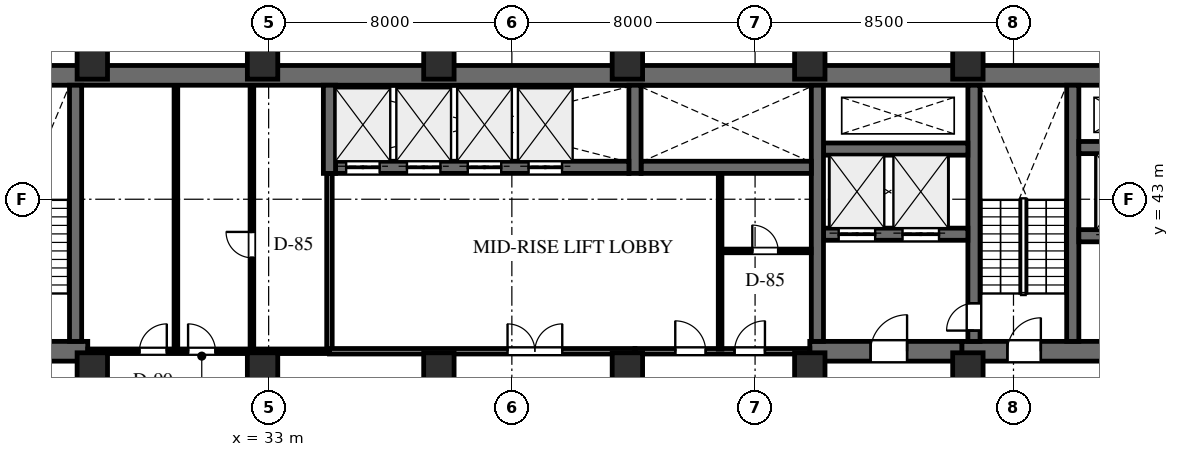
"""IFC4 building model, lengths in metres.
Left out: names, types, materials, properties, quantities, classifications, styles, units other than length and angle.
Written with IfcOpenShell. Run it as: python <this file> out.ifc"""

import sys

from ifc_helpers import new_model, si_unit, direction, frame, frame_2d, origin, origin_2d, place, context, subcontext, project, spatial, rectangle, extrude, element, fill, save


model = new_model("IFC4")
c1 = context("Model", 3, precision=1e-05, world=origin(), true_north=direction((0.0, 1.0)))
c2 = subcontext(c1, "Body", "Model", "MODEL_VIEW")
j1 = project(units=[si_unit("LENGTHUNIT", "METRE"), si_unit("PLANEANGLEUNIT", "RADIAN")], contexts=[c1])
p1 = place(None, origin())
s1 = spatial("IfcSite", under=j1, at=p1, CompositionType="ELEMENT")
p2 = place(p1, origin())
s2 = spatial("IfcBuilding", under=s1, at=p2, CompositionType="ELEMENT")
p3 = place(p2, frame((0.0, 0.0, 124.0)))
s3 = spatial("IfcBuildingStorey", under=s2, at=p3, CompositionType="ELEMENT", Elevation=124.0)
p4 = place(p3, frame((22.9, 47.075, 0.0), z_axis=(0.0, 0.0, 1.0), x_axis=(1.0, 0.0, 0.0)))
e1 = element("IfcWall", 1, at=p4, inside=s3, PredefinedType="SHEAR", context=c2, shape_type="SweptSolid", body=[
    extrude(rectangle(XDim=43.6, YDim=0.65, at=frame_2d((21.8, 0.0))), origin(), (0.0, 0.0, 1.0), 4.0),
])
p5 = place(p3, frame((55.8, 38.0, 0.0), z_axis=(0.0, 0.0, 1.0), x_axis=(1.0, 0.0, 0.0)))
e2 = element("IfcWall", 2, at=p5, inside=s3, PredefinedType="SHEAR", context=c2, shape_type="SweptSolid", body=[
    extrude(rectangle(XDim=10.7, YDim=0.65, at=frame_2d((5.35, 0.0))), origin(), (0.0, 0.0, 1.0), 4.0),
])
p6 = place(p5, frame((1.5, 0.0, 0.0)))
e3 = element("IfcOpeningElement", 3, at=p6, cuts=e2, PredefinedType="OPENING", context=c2, shape_type="SweptSolid", body=[
    extrude(rectangle(XDim=1.1, YDim=2.2, at=frame_2d((0.55, 1.1))), frame((0.0, 0.335, 0.0), z_axis=(0.0, -1.0, 0.0), x_axis=(1.0, 0.0, 0.0)), (0.0, 0.0, 1.0), 0.67),
])
p7 = place(p5, frame((4.82, 0.0, 0.0)))
e4 = element("IfcOpeningElement", 4, at=p7, cuts=e2, PredefinedType="OPENING", context=c2, shape_type="SweptSolid", body=[
    extrude(rectangle(XDim=1.0, YDim=2.15, at=frame_2d((0.5, 1.075))), frame((0.0, 0.335, 0.0), z_axis=(0.0, -1.0, 0.0), x_axis=(1.0, 0.0, 0.0)), (0.0, 0.0, 1.0), 0.67),
])
p8 = place(p5, frame((8.05, 0.0, 0.0)))
e5 = element("IfcOpeningElement", 5, at=p8, cuts=e2, PredefinedType="OPENING", context=c2, shape_type="SweptSolid", body=[
    extrude(rectangle(XDim=1.1, YDim=2.2, at=frame_2d((0.55, 1.1))), frame((0.0, 0.335, 0.0), z_axis=(0.0, -1.0, 0.0), x_axis=(1.0, 0.0, 0.0)), (0.0, 0.0, 1.0), 0.67),
])
p9 = place(p3, frame((59.45, 38.325, 0.0), z_axis=(0.0, 0.0, 1.0), x_axis=(0.0, 1.0, 0.0)))
e6 = element("IfcWall", 6, at=p9, inside=s3, PredefinedType="SHEAR", context=c2, shape_type="SweptSolid", body=[
    extrude(rectangle(XDim=8.425, YDim=0.4, at=frame_2d((4.212, 0.0))), origin(), (0.0, 0.0, 1.0), 4.0),
])
p10 = place(p3, frame((56.2, 38.325, 0.0), z_axis=(0.0, 0.0, 1.0), x_axis=(0.0, 1.0, 0.0)))
e7 = element("IfcWall", 7, at=p10, inside=s3, PredefinedType="SHEAR", context=c2, shape_type="SweptSolid", body=[
    extrude(rectangle(XDim=8.425, YDim=0.4, at=frame_2d((4.212, 0.0))), origin(), (0.0, 0.0, 1.0), 4.0),
])
p11 = place(p10, frame((0.355, 0.0, 0.0)))
e8 = element("IfcOpeningElement", 8, at=p11, cuts=e7, PredefinedType="OPENING", context=c2, shape_type="SweptSolid", body=[
    extrude(rectangle(XDim=0.9, YDim=2.15, at=frame_2d((0.45, 1.075))), frame((0.0, 0.21, 0.0), z_axis=(0.0, -1.0, 0.0), x_axis=(1.0, 0.0, 0.0)), (0.0, 0.0, 1.0), 0.42),
])
p12 = place(p3, frame((59.65, 41.8, 0.0), z_axis=(0.0, 0.0, 1.0), x_axis=(1.0, 0.0, 0.0)))
e9 = element("IfcWall", 9, at=p12, inside=s3, PredefinedType="SHEAR", context=c2, shape_type="SweptSolid", body=[
    extrude(rectangle(XDim=2.95, YDim=0.4, at=frame_2d((1.475, 0.0))), origin(), (0.0, 0.0, 1.0), 4.0),
])
p13 = place(p12, frame((0.87, 0.0, 0.0)))
e10 = element("IfcOpeningElement", 10, at=p13, cuts=e9, PredefinedType="OPENING", context=c2, shape_type="SweptSolid", body=[
    extrude(rectangle(XDim=1.2, YDim=2.2, at=frame_2d((0.6, 1.1))), frame((0.0, 0.21, 0.0), z_axis=(0.0, -1.0, 0.0), x_axis=(1.0, 0.0, 0.0)), (0.0, 0.0, 1.0), 0.42),
])
p14 = place(p3, frame((59.65, 44.7, 0.0), z_axis=(0.0, 0.0, 1.0), x_axis=(1.0, 0.0, 0.0)))
e11 = element("IfcWall", 11, at=p14, inside=s3, PredefinedType="SHEAR", context=c2, shape_type="SweptSolid", body=[
    extrude(rectangle(XDim=2.95, YDim=0.4, at=frame_2d((1.475, 0.0))), origin(), (0.0, 0.0, 1.0), 4.0),
])
p15 = place(p3, frame((50.8, 38.0, 0.0), z_axis=(0.0, 0.0, 1.0), x_axis=(1.0, 0.0, 0.0)))
e12 = element("IfcWall", 12, at=p15, inside=s3, PredefinedType="SHEAR", context=c2, shape_type="SweptSolid", body=[
    extrude(rectangle(XDim=5.0, YDim=0.65, at=frame_2d((2.5, 0.0))), origin(), (0.0, 0.0, 1.0), 4.0),
])
p16 = place(p15, frame((2.0, 0.0, 0.0)))
e13 = element("IfcOpeningElement", 13, at=p16, cuts=e12, PredefinedType="OPENING", context=c2, shape_type="SweptSolid", body=[
    extrude(rectangle(XDim=1.2, YDim=2.2, at=frame_2d((0.6, 1.1))), frame((0.0, 0.335, 0.0), z_axis=(0.0, -1.0, 0.0), x_axis=(1.0, 0.0, 0.0)), (0.0, 0.0, 1.0), 0.67),
])
p17 = place(p3, frame((51.25, 41.85, 0.0), z_axis=(0.0, 0.0, 1.0), x_axis=(1.0, 0.0, 0.0)))
e14 = element("IfcWall", 14, at=p17, inside=s3, PredefinedType="SHEAR", context=c2, shape_type="SweptSolid", body=[
    extrude(rectangle(XDim=4.75, YDim=0.4, at=frame_2d((2.375, 0.0))), origin(), (0.0, 0.0, 1.0), 4.0),
])
p18 = place(p17, frame((0.5, 0.0, 0.0)))
e15 = element("IfcOpeningElement", 15, at=p18, cuts=e14, PredefinedType="OPENING", context=c2, shape_type="SweptSolid", body=[
    extrude(rectangle(XDim=1.2, YDim=2.2, at=frame_2d((0.6, 1.1))), frame((0.0, 0.21, 0.0), z_axis=(0.0, -1.0, 0.0), x_axis=(1.0, 0.0, 0.0)), (0.0, 0.0, 1.0), 0.42),
])
p19 = place(p17, frame((2.6, 0.0, 0.0)))
e16 = element("IfcOpeningElement", 16, at=p19, cuts=e14, PredefinedType="OPENING", context=c2, shape_type="SweptSolid", body=[
    extrude(rectangle(XDim=1.2, YDim=2.2, at=frame_2d((0.6, 1.1))), frame((0.0, 0.21, 0.0), z_axis=(0.0, -1.0, 0.0), x_axis=(1.0, 0.0, 0.0)), (0.0, 0.0, 1.0), 0.42),
])
p20 = place(p3, frame((51.25, 44.65, 0.0), z_axis=(0.0, 0.0, 1.0), x_axis=(1.0, 0.0, 0.0)))
e17 = element("IfcWall", 17, at=p20, inside=s3, PredefinedType="SHEAR", context=c2, shape_type="SweptSolid", body=[
    extrude(rectangle(XDim=4.75, YDim=0.4, at=frame_2d((2.375, 0.0))), origin(), (0.0, 0.0, 1.0), 4.0),
])
p21 = place(p3, frame((51.05, 38.325, 0.0), z_axis=(0.0, 0.0, 1.0), x_axis=(0.0, 1.0, 0.0)))
e18 = element("IfcWall", 18, at=p21, inside=s3, PredefinedType="SHEAR", context=c2, shape_type="SweptSolid", body=[
    extrude(rectangle(XDim=8.425, YDim=0.4, at=frame_2d((4.212, 0.0))), origin(), (0.0, 0.0, 1.0), 4.0),
])
p22 = place(p3, frame((45.25, 44.05, 0.0), z_axis=(0.0, 0.0, 1.0), x_axis=(1.0, 0.0, 0.0)))
e19 = element("IfcWall", 19, at=p22, inside=s3, PredefinedType="SHEAR", context=c2, shape_type="SweptSolid", body=[
    extrude(rectangle(XDim=5.6, YDim=0.4, at=frame_2d((2.8, 0.0))), origin(), (0.0, 0.0, 1.0), 4.0),
])
p23 = place(p3, frame((45.05, 43.85, 0.0), z_axis=(0.0, 0.0, 1.0), x_axis=(0.0, 1.0, 0.0)))
e20 = element("IfcWall", 20, at=p23, inside=s3, PredefinedType="SHEAR", context=c2, shape_type="SweptSolid", body=[
    extrude(rectangle(XDim=2.9, YDim=0.4, at=frame_2d((1.45, 0.0))), origin(), (0.0, 0.0, 1.0), 4.0),
])
p24 = place(p3, frame((35.2, 44.05, 0.0), z_axis=(0.0, 0.0, 1.0), x_axis=(1.0, 0.0, 0.0)))
e21 = element("IfcWall", 21, at=p24, inside=s3, PredefinedType="SHEAR", context=c2, shape_type="SweptSolid", body=[
    extrude(rectangle(XDim=9.65, YDim=0.4, at=frame_2d((4.825, 0.0))), origin(), (0.0, 0.0, 1.0), 4.0),
])
p25 = place(p24, frame((0.35, 0.0, 0.0)))
e22 = element("IfcOpeningElement", 22, at=p25, cuts=e21, PredefinedType="OPENING", context=c2, shape_type="SweptSolid", body=[
    extrude(rectangle(XDim=1.1, YDim=2.2, at=frame_2d((0.55, 1.1))), frame((0.0, 0.21, 0.0), z_axis=(0.0, -1.0, 0.0), x_axis=(1.0, 0.0, 0.0)), (0.0, 0.0, 1.0), 0.42),
])
p26 = place(p24, frame((2.35, 0.0, 0.0)))
e23 = element("IfcOpeningElement", 23, at=p26, cuts=e21, PredefinedType="OPENING", context=c2, shape_type="SweptSolid", body=[
    extrude(rectangle(XDim=1.1, YDim=2.2, at=frame_2d((0.55, 1.1))), frame((0.0, 0.21, 0.0), z_axis=(0.0, -1.0, 0.0), x_axis=(1.0, 0.0, 0.0)), (0.0, 0.0, 1.0), 0.42),
])
p27 = place(p24, frame((4.35, 0.0, 0.0)))
e24 = element("IfcOpeningElement", 24, at=p27, cuts=e21, PredefinedType="OPENING", context=c2, shape_type="SweptSolid", body=[
    extrude(rectangle(XDim=1.1, YDim=2.2, at=frame_2d((0.55, 1.1))), frame((0.0, 0.21, 0.0), z_axis=(0.0, -1.0, 0.0), x_axis=(1.0, 0.0, 0.0)), (0.0, 0.0, 1.0), 0.42),
])
p28 = place(p24, frame((6.35, 0.0, 0.0)))
e25 = element("IfcOpeningElement", 25, at=p28, cuts=e21, PredefinedType="OPENING", context=c2, shape_type="SweptSolid", body=[
    extrude(rectangle(XDim=1.1, YDim=2.2, at=frame_2d((0.55, 1.1))), frame((0.0, 0.21, 0.0), z_axis=(0.0, -1.0, 0.0), x_axis=(1.0, 0.0, 0.0)), (0.0, 0.0, 1.0), 0.42),
])
p29 = place(p3, frame((35.0, 43.85, 0.0), z_axis=(0.0, 0.0, 1.0), x_axis=(0.0, 1.0, 0.0)))
e26 = element("IfcWall", 26, at=p29, inside=s3, PredefinedType="SHEAR", context=c2, shape_type="SweptSolid", body=[
    extrude(rectangle(XDim=2.9, YDim=0.4, at=frame_2d((1.45, 0.0))), origin(), (0.0, 0.0, 1.0), 4.0),
])
p30 = place(p3, frame((22.95, 38.0, 0.0), z_axis=(0.0, 0.0, 1.0), x_axis=(1.0, 0.0, 0.0)))
e27 = element("IfcWall", 27, at=p30, inside=s3, PredefinedType="SHEAR", context=c2, shape_type="SweptSolid", body=[
    extrude(rectangle(XDim=4.1, YDim=0.65, at=frame_2d((2.05, 0.0))), origin(), (0.0, 0.0, 1.0), 4.0),
])
p31 = place(p30, frame((1.5, 0.0, 0.0)))
e28 = element("IfcOpeningElement", 28, at=p31, cuts=e27, PredefinedType="OPENING", context=c2, shape_type="SweptSolid", body=[
    extrude(rectangle(XDim=1.1, YDim=2.2, at=frame_2d((0.55, 1.1))), frame((0.0, 0.335, 0.0), z_axis=(0.0, -1.0, 0.0), x_axis=(1.0, 0.0, 0.0)), (0.0, 0.0, 1.0), 0.67),
])
p32 = place(p3, frame((26.65, 38.325, 0.0), z_axis=(0.0, 0.0, 1.0), x_axis=(0.0, 1.0, 0.0)))
e29 = element("IfcWall", 29, at=p32, inside=s3, PredefinedType="SHEAR", context=c2, shape_type="SweptSolid", body=[
    extrude(rectangle(XDim=8.425, YDim=0.4, at=frame_2d((4.212, 0.0))), origin(), (0.0, 0.0, 1.0), 4.0),
])
for number, where, z_axis, x_axis in (
    (30, (56.0, 47.55, 0.0), (0.0, 0.0, 1.0), (1.0, 0.0, 0.0)),
    (31, (56.0, 37.35, 0.0), (0.0, 0.0, 1.0), (1.0, 0.0, 0.0)),
    (32, (50.8, 47.55, 0.0), (0.0, 0.0, 1.0), (1.0, 0.0, 0.0)),
    (33, (50.8, 37.35, 0.0), (0.0, 0.0, 1.0), (1.0, 0.0, 0.0)),
    (34, (44.8, 37.35, 0.0), (0.0, 0.0, 1.0), (1.0, 0.0, 0.0)),
    (35, (44.8, 47.55, 0.0), (0.0, 0.0, 1.0), (1.0, 0.0, 0.0)),
    (36, (38.6, 37.35, 0.0), (0.0, 0.0, 1.0), (1.0, 0.0, 0.0)),
    (37, (38.6, 47.55, 0.0), (0.0, 0.0, 1.0), (1.0, 0.0, 0.0)),
    (38, (32.8, 37.35, 0.0), (0.0, 0.0, 1.0), (1.0, 0.0, 0.0)),
    (39, (32.8, 47.55, 0.0), (0.0, 0.0, 1.0), (1.0, 0.0, 0.0)),
    (40, (27.2, 37.35, 0.0), (0.0, 0.0, 1.0), (1.0, 0.0, 0.0)),
    (41, (27.2, 47.55, 0.0), (0.0, 0.0, 1.0), (1.0, 0.0, 0.0)),
):
    element("IfcColumn", number, at=place(p3, frame(where, z_axis=z_axis, x_axis=x_axis)), inside=s3, PredefinedType="COLUMN", context=c2, shape_type="SweptSolid", body=[
        extrude(rectangle(XDim=1.0, YDim=1.2, at=origin_2d()), origin(), (0.0, 0.0, 1.0), 4.0),
    ])
p33 = place(p3, frame((45.05, 38.0, 0.0), z_axis=(0.0, 0.0, 1.0), x_axis=(1.0, 0.0, 0.0)))
e42 = element("IfcWall", 42, at=p33, inside=s3, PredefinedType="STANDARD", context=c2, shape_type="SweptSolid", body=[
    extrude(rectangle(XDim=5.75, YDim=0.18, at=frame_2d((2.875, 0.0))), origin(), (0.0, 0.0, 1.0), 2.894),
])
p34 = place(p33, frame((1.325, 0.0, 0.0)))
e43 = element("IfcOpeningElement", 43, at=p34, cuts=e42, PredefinedType="OPENING", context=c2, shape_type="SweptSolid", body=[
    extrude(rectangle(XDim=1.0, YDim=2.15, at=frame_2d((0.5, 1.075))), frame((0.0, 0.1, 0.0), z_axis=(0.0, -1.0, 0.0), x_axis=(1.0, 0.0, 0.0)), (0.0, 0.0, 1.0), 0.2),
])
p35 = place(p33, frame((3.275, 0.0, 0.0)))
e44 = element("IfcOpeningElement", 44, at=p35, cuts=e42, PredefinedType="OPENING", context=c2, shape_type="SweptSolid", body=[
    extrude(rectangle(XDim=1.0, YDim=2.15, at=frame_2d((0.5, 1.075))), frame((0.0, 0.1, 0.0), z_axis=(0.0, -1.0, 0.0), x_axis=(1.0, 0.0, 0.0)), (0.0, 0.0, 1.0), 0.2),
])
p36 = place(p3, frame((47.85, 38.068, 0.0), z_axis=(0.0, 0.0, 1.0), x_axis=(0.0, 1.0, 0.0)))
e45 = element("IfcWall", 45, at=p36, inside=s3, PredefinedType="PARTITIONING", context=c2, shape_type="SweptSolid", body=[
    extrude(rectangle(XDim=5.774, YDim=0.12, at=frame_2d((2.887, 0.0))), origin(), (0.0, 0.0, 1.0), 3.75),
])
p37 = place(p3, frame((47.918, 41.3, 0.0), z_axis=(0.0, 0.0, 1.0), x_axis=(1.0, 0.0, 0.0)))
e46 = element("IfcWall", 46, at=p37, inside=s3, PredefinedType="PARTITIONING", context=c2, shape_type="SweptSolid", body=[
    extrude(rectangle(XDim=2.924, YDim=0.12, at=frame_2d((1.462, 0.0))), origin(), (0.0, 0.0, 1.0), 2.894),
])
p38 = place(p37, frame((0.991, 0.0, 0.0)))
e47 = element("IfcOpeningElement", 47, at=p38, cuts=e46, PredefinedType="OPENING", context=c2, shape_type="SweptSolid", body=[
    extrude(rectangle(XDim=0.85, YDim=2.1, at=frame_2d((0.425, 1.05))), frame((0.0, 0.07, 0.0), z_axis=(0.0, -1.0, 0.0), x_axis=(1.0, 0.0, 0.0)), (0.0, 0.0, 1.0), 0.14),
])
p39 = place(p3, frame((27.05, 38.0, 0.0), z_axis=(0.0, 0.0, 1.0), x_axis=(1.0, 0.0, 0.0)))
e48 = element("IfcWall", 48, at=p39, inside=s3, PredefinedType="PARTITIONING", context=c2, shape_type="SweptSolid", body=[
    extrude(rectangle(XDim=7.95, YDim=0.15, at=frame_2d((3.975, 0.0))), origin(), (0.0, 0.0, 1.0), 2.894),
])
p40 = place(p39, frame((1.7, 0.0, 0.0)))
e49 = element("IfcOpeningElement", 49, at=p40, cuts=e48, PredefinedType="OPENING", context=c2, shape_type="SweptSolid", body=[
    extrude(rectangle(XDim=0.9, YDim=2.1, at=frame_2d((0.45, 1.05))), frame((0.0, 0.085, 0.0), z_axis=(0.0, -1.0, 0.0), x_axis=(1.0, 0.0, 0.0)), (0.0, 0.0, 1.0), 0.17),
])
p41 = place(p39, frame((3.3, 0.0, 0.0)))
e50 = element("IfcOpeningElement", 50, at=p41, cuts=e48, PredefinedType="OPENING", context=c2, shape_type="SweptSolid", body=[
    extrude(rectangle(XDim=0.9, YDim=2.1, at=frame_2d((0.45, 1.05))), frame((0.0, 0.085, 0.0), z_axis=(0.0, -1.0, 0.0), x_axis=(1.0, 0.0, 0.0)), (0.0, 0.0, 1.0), 0.17),
])
p42 = place(p3, frame((35.0, 38.0, 0.0), z_axis=(0.0, 0.0, 1.0), x_axis=(0.0, 1.0, 0.0)))
e51 = element("IfcWall", 51, at=p42, inside=s3, PredefinedType="STANDARD", context=c2, shape_type="SweptSolid", body=[
    extrude(rectangle(XDim=5.85, YDim=0.18, at=frame_2d((2.925, 0.0))), origin(), (0.0, 0.0, 1.0), 3.75),
])
p43 = place(p3, frame((29.95, 38.068, 0.0), z_axis=(0.0, 0.0, 1.0), x_axis=(0.0, 1.0, 0.0)))
e52 = element("IfcWall", 52, at=p43, inside=s3, PredefinedType="PARTITIONING", context=c2, shape_type="SweptSolid", body=[
    extrude(rectangle(XDim=8.674, YDim=0.12, at=frame_2d((4.337, 0.0))), origin(), (0.0, 0.0, 1.0), 3.75),
])
p44 = place(p3, frame((32.45, 38.068, 0.0), z_axis=(0.0, 0.0, 1.0), x_axis=(0.0, 1.0, 0.0)))
e53 = element("IfcWall", 53, at=p44, inside=s3, PredefinedType="PARTITIONING", context=c2, shape_type="SweptSolid", body=[
    extrude(rectangle(XDim=8.674, YDim=0.12, at=frame_2d((4.337, 0.0))), origin(), (0.0, 0.0, 1.0), 3.75),
])
p45 = place(p44, frame((3.007, 0.0, 0.0)))
e54 = element("IfcOpeningElement", 54, at=p45, cuts=e53, PredefinedType="OPENING", context=c2, shape_type="SweptSolid", body=[
    extrude(rectangle(XDim=0.85, YDim=2.1, at=frame_2d((0.425, 1.05))), frame((0.0, 0.07, 0.0), z_axis=(0.0, -1.0, 0.0), x_axis=(1.0, 0.0, 0.0)), (0.0, 0.0, 1.0), 0.14),
])
p46 = place(p3, frame((35.0, 38.0, 0.0), z_axis=(0.0, 0.0, 1.0), x_axis=(1.0, 0.0, 0.0)))
e55 = element("IfcWall", 55, at=p46, inside=s3, PredefinedType="STANDARD", context=c2, shape_type="SweptSolid", body=[
    extrude(rectangle(XDim=10.05, YDim=0.18, at=frame_2d((5.025, 0.0))), origin(), (0.0, 0.0, 1.0), 2.894),
])
p47 = place(p46, frame((5.858, 0.0, 0.0)))
e56 = element("IfcOpeningElement", 56, at=p47, cuts=e55, PredefinedType="OPENING", context=c2, shape_type="SweptSolid", body=[
    extrude(rectangle(XDim=1.8, YDim=2.2, at=frame_2d((0.9, 1.1))), frame((0.0, 0.1, 0.0), z_axis=(0.0, -1.0, 0.0), x_axis=(1.0, 0.0, 0.0)), (0.0, 0.0, 1.0), 0.2),
])
p48 = place(p6, origin())
e57 = element("IfcDoor", 57, at=p48, inside=s3, OperationType="SINGLE_SWING_RIGHT", PredefinedType="DOOR", context=c2, shape_type="SweptSolid", body=[
    extrude(rectangle(XDim=1.1, YDim=2.2, at=frame_2d((0.55, 1.1))), frame((0.0, 0.025, 0.0), z_axis=(0.0, -1.0, 0.0), x_axis=(1.0, 0.0, 0.0)), (0.0, 0.0, 1.0), 0.05),
])
fill(e3, e57)
p49 = place(p16, origin())
e58 = element("IfcDoor", 58, at=p49, inside=s3, OperationType="SINGLE_SWING_RIGHT", PredefinedType="DOOR", context=c2, shape_type="SweptSolid", body=[
    extrude(rectangle(XDim=1.2, YDim=2.2, at=frame_2d((0.6, 1.1))), frame((0.0, 0.025, 0.0), z_axis=(0.0, -1.0, 0.0), x_axis=(1.0, 0.0, 0.0)), (0.0, 0.0, 1.0), 0.05),
])
fill(e13, e58)
p50 = place(p11, origin())
e59 = element("IfcDoor", 59, at=p50, inside=s3, OperationType="SINGLE_SWING_LEFT", PredefinedType="DOOR", context=c2, shape_type="SweptSolid", body=[
    extrude(rectangle(XDim=0.9, YDim=2.15, at=frame_2d((0.45, 1.075))), frame((0.0, 0.025, 0.0), z_axis=(0.0, -1.0, 0.0), x_axis=(1.0, 0.0, 0.0)), (0.0, 0.0, 1.0), 0.05),
])
fill(e8, e59)
p51 = place(p25, origin())
e60 = element("IfcDoor", 60, at=p51, inside=s3, OperationType="DOUBLE_DOOR_SLIDING", PredefinedType="DOOR", context=c2, shape_type="SweptSolid", body=[
    extrude(rectangle(XDim=1.1, YDim=2.2, at=frame_2d((0.55, 1.1))), frame((0.0, 0.025, 0.0), z_axis=(0.0, -1.0, 0.0), x_axis=(1.0, 0.0, 0.0)), (0.0, 0.0, 1.0), 0.05),
])
fill(e22, e60)
p52 = place(p26, origin())
e61 = element("IfcDoor", 61, at=p52, inside=s3, OperationType="DOUBLE_DOOR_SLIDING", PredefinedType="DOOR", context=c2, shape_type="SweptSolid", body=[
    extrude(rectangle(XDim=1.1, YDim=2.2, at=frame_2d((0.55, 1.1))), frame((0.0, 0.025, 0.0), z_axis=(0.0, -1.0, 0.0), x_axis=(1.0, 0.0, 0.0)), (0.0, 0.0, 1.0), 0.05),
])
fill(e23, e61)
p53 = place(p27, origin())
e62 = element("IfcDoor", 62, at=p53, inside=s3, OperationType="DOUBLE_DOOR_SLIDING", PredefinedType="DOOR", context=c2, shape_type="SweptSolid", body=[
    extrude(rectangle(XDim=1.1, YDim=2.2, at=frame_2d((0.55, 1.1))), frame((0.0, 0.025, 0.0), z_axis=(0.0, -1.0, 0.0), x_axis=(1.0, 0.0, 0.0)), (0.0, 0.0, 1.0), 0.05),
])
fill(e24, e62)
p54 = place(p28, origin())
e63 = element("IfcDoor", 63, at=p54, inside=s3, OperationType="DOUBLE_DOOR_SLIDING", PredefinedType="DOOR", context=c2, shape_type="SweptSolid", body=[
    extrude(rectangle(XDim=1.1, YDim=2.2, at=frame_2d((0.55, 1.1))), frame((0.0, 0.025, 0.0), z_axis=(0.0, -1.0, 0.0), x_axis=(1.0, 0.0, 0.0)), (0.0, 0.0, 1.0), 0.05),
])
fill(e25, e63)
p55 = place(p18, origin())
e64 = element("IfcDoor", 64, at=p55, inside=s3, OperationType="DOUBLE_DOOR_SLIDING", PredefinedType="DOOR", context=c2, shape_type="SweptSolid", body=[
    extrude(rectangle(XDim=1.2, YDim=2.2, at=frame_2d((0.6, 1.1))), frame((0.0, 0.025, 0.0), z_axis=(0.0, -1.0, 0.0), x_axis=(1.0, 0.0, 0.0)), (0.0, 0.0, 1.0), 0.05),
])
fill(e15, e64)
p56 = place(p19, origin())
e65 = element("IfcDoor", 65, at=p56, inside=s3, OperationType="DOUBLE_DOOR_SLIDING", PredefinedType="DOOR", context=c2, shape_type="SweptSolid", body=[
    extrude(rectangle(XDim=1.2, YDim=2.2, at=frame_2d((0.6, 1.1))), frame((0.0, 0.025, 0.0), z_axis=(0.0, -1.0, 0.0), x_axis=(1.0, 0.0, 0.0)), (0.0, 0.0, 1.0), 0.05),
])
fill(e16, e65)
p57 = place(p34, origin())
e66 = element("IfcDoor", 66, at=p57, inside=s3, OperationType="SINGLE_SWING_LEFT", PredefinedType="DOOR", context=c2, shape_type="SweptSolid", body=[
    extrude(rectangle(XDim=1.0, YDim=2.15, at=frame_2d((0.5, 1.075))), frame((0.0, 0.025, 0.0), z_axis=(0.0, -1.0, 0.0), x_axis=(1.0, 0.0, 0.0)), (0.0, 0.0, 1.0), 0.05),
])
fill(e43, e66)
p58 = place(p35, origin())
e67 = element("IfcDoor", 67, at=p58, inside=s3, OperationType="SINGLE_SWING_RIGHT", PredefinedType="DOOR", context=c2, shape_type="SweptSolid", body=[
    extrude(rectangle(XDim=1.0, YDim=2.15, at=frame_2d((0.5, 1.075))), frame((0.0, 0.025, 0.0), z_axis=(0.0, -1.0, 0.0), x_axis=(1.0, 0.0, 0.0)), (0.0, 0.0, 1.0), 0.05),
])
fill(e44, e67)
p59 = place(p38, origin())
e68 = element("IfcDoor", 68, at=p59, inside=s3, OperationType="SINGLE_SWING_LEFT", PredefinedType="DOOR", context=c2, shape_type="SweptSolid", body=[
    extrude(rectangle(XDim=0.85, YDim=2.1, at=frame_2d((0.425, 1.05))), frame((0.0, 0.025, 0.0), z_axis=(0.0, -1.0, 0.0), x_axis=(1.0, 0.0, 0.0)), (0.0, 0.0, 1.0), 0.05),
])
fill(e47, e68)
p60 = place(p40, origin())
e69 = element("IfcDoor", 69, at=p60, inside=s3, OperationType="SINGLE_SWING_RIGHT", PredefinedType="DOOR", context=c2, shape_type="SweptSolid", body=[
    extrude(rectangle(XDim=0.9, YDim=2.1, at=frame_2d((0.45, 1.05))), frame((0.0, 0.025, 0.0), z_axis=(0.0, -1.0, 0.0), x_axis=(1.0, 0.0, 0.0)), (0.0, 0.0, 1.0), 0.05),
])
fill(e49, e69)
p61 = place(p41, origin())
e70 = element("IfcDoor", 70, at=p61, inside=s3, OperationType="SINGLE_SWING_LEFT", PredefinedType="DOOR", context=c2, shape_type="SweptSolid", body=[
    extrude(rectangle(XDim=0.9, YDim=2.1, at=frame_2d((0.45, 1.05))), frame((0.0, 0.025, 0.0), z_axis=(0.0, -1.0, 0.0), x_axis=(1.0, 0.0, 0.0)), (0.0, 0.0, 1.0), 0.05),
])
fill(e50, e70)
p62 = place(p45, origin())
e71 = element("IfcDoor", 71, at=p62, inside=s3, OperationType="SINGLE_SWING_RIGHT", PredefinedType="DOOR", context=c2, shape_type="SweptSolid", body=[
    extrude(rectangle(XDim=0.85, YDim=2.1, at=frame_2d((0.425, 1.05))), frame((0.0, 0.025, 0.0), z_axis=(0.0, -1.0, 0.0), x_axis=(1.0, 0.0, 0.0)), (0.0, 0.0, 1.0), 0.05),
])
fill(e54, e71)
p63 = place(p47, origin())
e72 = element("IfcDoor", 72, at=p63, inside=s3, OperationType="DOUBLE_DOOR_SINGLE_SWING", PredefinedType="DOOR", context=c2, shape_type="SweptSolid", body=[
    extrude(rectangle(XDim=1.8, YDim=2.2, at=frame_2d((0.9, 1.1))), frame((0.0, 0.025, 0.0), z_axis=(0.0, -1.0, 0.0), x_axis=(1.0, 0.0, 0.0)), (0.0, 0.0, 1.0), 0.05),
])
fill(e56, e72)
save(model, sys.argv[1])
